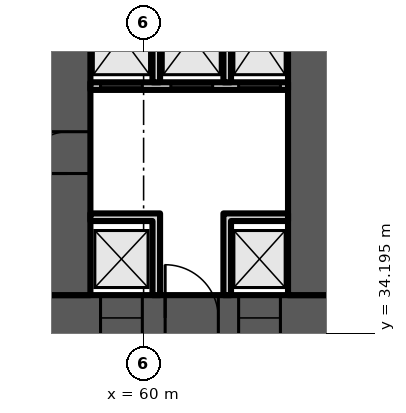
"""IFC4 building model, lengths in metres.
Left out: names, types, materials, properties, quantities, classifications, styles, units other than length and angle.
Written with IfcOpenShell. Run it as: python <this file> out.ifc"""

import sys

from ifc_helpers import new_model, si_unit, direction, frame, frame_2d, origin, place, context, subcontext, project, spatial, polyline, rectangle, outline, extrude, element, fill, save


model = new_model("IFC4")
c1 = context("Model", 3, precision=1e-05, world=origin(), true_north=direction((0.0, 1.0)))
c2 = subcontext(c1, "Body", "Model", "MODEL_VIEW")
j1 = project(units=[si_unit("LENGTHUNIT", "METRE"), si_unit("PLANEANGLEUNIT", "RADIAN")], contexts=[c1])
p1 = place(None, origin())
s1 = spatial("IfcSite", under=j1, at=p1, CompositionType="ELEMENT")
p2 = place(p1, origin())
s2 = spatial("IfcBuilding", under=s1, at=p2, CompositionType="ELEMENT")
p3 = place(p2, frame((0.0, 0.0, 52.3)))
s3 = spatial("IfcBuildingStorey", under=s2, at=p3, CompositionType="ELEMENT", Elevation=52.3)
p4 = place(p3, frame((9.0, 34.6, 0.0), z_axis=(0.0, 0.0, 1.0), x_axis=(1.0, 0.0, 0.0)))
e1 = element("IfcWall", 1, at=p4, inside=s3, PredefinedType="SHEAR", context=c2, shape_type="SweptSolid", body=[
    extrude(rectangle(XDim=56.0, YDim=1.2, at=frame_2d((28.0, 0.0))), origin(), (0.0, 0.0, 1.0), 3.6),
])
p5 = place(p4, frame((2.0, 0.0, 0.0)))
e2 = element("IfcOpeningElement", 2, at=p5, cuts=e1, PredefinedType="OPENING", context=c2, shape_type="SweptSolid", body=[
    extrude(rectangle(XDim=1.0, YDim=2.1, at=frame_2d((0.5, 1.05))), frame((0.0, 0.61, 0.0), z_axis=(0.0, -1.0, 0.0), x_axis=(1.0, 0.0, 0.0)), (0.0, 0.0, 1.0), 1.22),
])
p6 = place(p4, frame((4.6, 0.0, 0.0)))
e3 = element("IfcOpeningElement", 3, at=p6, cuts=e1, PredefinedType="OPENING", context=c2, shape_type="SweptSolid", body=[
    extrude(rectangle(XDim=1.0, YDim=2.1, at=frame_2d((0.5, 1.05))), frame((0.0, 0.61, 0.0), z_axis=(0.0, -1.0, 0.0), x_axis=(1.0, 0.0, 0.0)), (0.0, 0.0, 1.0), 1.22),
])
p7 = place(p4, frame((7.867, 0.0, 0.0)))
e4 = element("IfcOpeningElement", 4, at=p7, cuts=e1, PredefinedType="OPENING", context=c2, shape_type="SweptSolid", body=[
    extrude(rectangle(XDim=1.1, YDim=2.1, at=frame_2d((0.55, 1.05))), frame((0.0, 0.61, 0.0), z_axis=(0.0, -1.0, 0.0), x_axis=(1.0, 0.0, 0.0)), (0.0, 0.0, 1.0), 1.22),
])
p8 = place(p4, frame((12.033, 0.0, 0.0)))
e5 = element("IfcOpeningElement", 5, at=p8, cuts=e1, PredefinedType="OPENING", context=c2, shape_type="SweptSolid", body=[
    extrude(rectangle(XDim=1.1, YDim=2.1, at=frame_2d((0.55, 1.05))), frame((0.0, 0.61, 0.0), z_axis=(0.0, -1.0, 0.0), x_axis=(1.0, 0.0, 0.0)), (0.0, 0.0, 1.0), 1.22),
])
p9 = place(p4, frame((9.8, 0.0, 0.0)))
e6 = element("IfcOpeningElement", 6, at=p9, cuts=e1, PredefinedType="OPENING", context=c2, shape_type="SweptSolid", body=[
    extrude(rectangle(XDim=1.4, YDim=2.1, at=frame_2d((0.7, 1.05))), frame((0.0, 0.61, 0.0), z_axis=(0.0, -1.0, 0.0), x_axis=(1.0, 0.0, 0.0)), (0.0, 0.0, 1.0), 1.22),
])
p10 = place(p4, frame((14.65, 0.0, 0.0)))
e7 = element("IfcOpeningElement", 7, at=p10, cuts=e1, PredefinedType="OPENING", context=c2, shape_type="SweptSolid", body=[
    extrude(rectangle(XDim=1.2, YDim=2.1, at=frame_2d((0.6, 1.05))), frame((0.0, 0.61, 0.0), z_axis=(0.0, -1.0, 0.0), x_axis=(1.0, 0.0, 0.0)), (0.0, 0.0, 1.0), 1.22),
])
p11 = place(p4, frame((21.867, 0.0, 0.0)))
e8 = element("IfcOpeningElement", 8, at=p11, cuts=e1, PredefinedType="OPENING", context=c2, shape_type="SweptSolid", body=[
    extrude(rectangle(XDim=1.1, YDim=2.1, at=frame_2d((0.55, 1.05))), frame((0.0, 0.61, 0.0), z_axis=(0.0, -1.0, 0.0), x_axis=(1.0, 0.0, 0.0)), (0.0, 0.0, 1.0), 1.22),
])
p12 = place(p4, frame((26.033, 0.0, 0.0)))
e9 = element("IfcOpeningElement", 9, at=p12, cuts=e1, PredefinedType="OPENING", context=c2, shape_type="SweptSolid", body=[
    extrude(rectangle(XDim=1.1, YDim=2.1, at=frame_2d((0.55, 1.05))), frame((0.0, 0.61, 0.0), z_axis=(0.0, -1.0, 0.0), x_axis=(1.0, 0.0, 0.0)), (0.0, 0.0, 1.0), 1.22),
])
p13 = place(p4, frame((23.8, 0.0, 0.0)))
e10 = element("IfcOpeningElement", 10, at=p13, cuts=e1, PredefinedType="OPENING", context=c2, shape_type="SweptSolid", body=[
    extrude(rectangle(XDim=1.4, YDim=2.1, at=frame_2d((0.7, 1.05))), frame((0.0, 0.61, 0.0), z_axis=(0.0, -1.0, 0.0), x_axis=(1.0, 0.0, 0.0)), (0.0, 0.0, 1.0), 1.22),
])
p14 = place(p4, frame((28.867, 0.0, 0.0)))
e11 = element("IfcOpeningElement", 11, at=p14, cuts=e1, PredefinedType="OPENING", context=c2, shape_type="SweptSolid", body=[
    extrude(rectangle(XDim=1.1, YDim=2.1, at=frame_2d((0.55, 1.05))), frame((0.0, 0.61, 0.0), z_axis=(0.0, -1.0, 0.0), x_axis=(1.0, 0.0, 0.0)), (0.0, 0.0, 1.0), 1.22),
])
p15 = place(p4, frame((33.033, 0.0, 0.0)))
e12 = element("IfcOpeningElement", 12, at=p15, cuts=e1, PredefinedType="OPENING", context=c2, shape_type="SweptSolid", body=[
    extrude(rectangle(XDim=1.1, YDim=2.1, at=frame_2d((0.55, 1.05))), frame((0.0, 0.61, 0.0), z_axis=(0.0, -1.0, 0.0), x_axis=(1.0, 0.0, 0.0)), (0.0, 0.0, 1.0), 1.22),
])
p16 = place(p4, frame((40.15, 0.0, 0.0)))
e13 = element("IfcOpeningElement", 13, at=p16, cuts=e1, PredefinedType="OPENING", context=c2, shape_type="SweptSolid", body=[
    extrude(rectangle(XDim=1.2, YDim=2.1, at=frame_2d((0.6, 1.05))), frame((0.0, 0.61, 0.0), z_axis=(0.0, -1.0, 0.0), x_axis=(1.0, 0.0, 0.0)), (0.0, 0.0, 1.0), 1.22),
])
p17 = place(p4, frame((44.8, 0.0, 0.0)))
e14 = element("IfcOpeningElement", 14, at=p17, cuts=e1, PredefinedType="OPENING", context=c2, shape_type="SweptSolid", body=[
    extrude(rectangle(XDim=1.4, YDim=2.1, at=frame_2d((0.7, 1.05))), frame((0.0, 0.61, 0.0), z_axis=(0.0, -1.0, 0.0), x_axis=(1.0, 0.0, 0.0)), (0.0, 0.0, 1.0), 1.22),
])
p18 = place(p4, frame((49.867, 0.0, 0.0)))
e15 = element("IfcOpeningElement", 15, at=p18, cuts=e1, PredefinedType="OPENING", context=c2, shape_type="SweptSolid", body=[
    extrude(rectangle(XDim=1.1, YDim=2.1, at=frame_2d((0.55, 1.05))), frame((0.0, 0.61, 0.0), z_axis=(0.0, -1.0, 0.0), x_axis=(1.0, 0.0, 0.0)), (0.0, 0.0, 1.0), 1.22),
])
p19 = place(p4, frame((53.5, 0.0, 0.0)))
e16 = element("IfcOpeningElement", 16, at=p19, cuts=e1, PredefinedType="OPENING", context=c2, shape_type="SweptSolid", body=[
    extrude(rectangle(XDim=1.1, YDim=2.1, at=frame_2d((0.55, 1.05))), frame((0.0, 0.61, 0.0), z_axis=(0.0, -1.0, 0.0), x_axis=(1.0, 0.0, 0.0)), (0.0, 0.0, 1.0), 1.22),
])
p20 = place(p4, frame((51.567, 0.0, 0.0)))
e17 = element("IfcOpeningElement", 17, at=p20, cuts=e1, PredefinedType="OPENING", context=c2, shape_type="SweptSolid", body=[
    extrude(rectangle(XDim=1.4, YDim=2.1, at=frame_2d((0.7, 1.05))), frame((0.0, 0.61, 0.0), z_axis=(0.0, -1.0, 0.0), x_axis=(1.0, 0.0, 0.0)), (0.0, 0.0, 1.0), 1.22),
])
p21 = place(p3, frame((58.0, 35.2, 0.0), z_axis=(0.0, 0.0, 1.0), x_axis=(0.0, 1.0, 0.0)))
e18 = element("IfcWall", 18, at=p21, inside=s3, PredefinedType="SHEAR", context=c2, shape_type="SweptSolid", body=[
    extrude(rectangle(XDim=12.943, YDim=1.2, at=frame_2d((6.471, 0.0))), origin(), (0.0, 0.0, 1.0), 3.6),
])
p22 = place(p21, frame((10.134, 0.0, 0.0)))
e19 = element("IfcOpeningElement", 19, at=p22, cuts=e18, PredefinedType="OPENING", context=c2, shape_type="SweptSolid", body=[
    extrude(rectangle(XDim=1.0, YDim=2.1, at=frame_2d((0.5, 1.05))), frame((0.0, 0.61, 0.0), z_axis=(0.0, -1.0, 0.0), x_axis=(1.0, 0.0, 0.0)), (0.0, 0.0, 1.0), 1.22),
])
p23 = place(p21, frame((3.2, 0.0, 0.0)))
e20 = element("IfcOpeningElement", 20, at=p23, cuts=e18, PredefinedType="OPENING", context=c2, shape_type="SweptSolid", body=[
    extrude(rectangle(XDim=1.1, YDim=2.1, at=frame_2d((0.55, 1.05))), frame((0.0, 0.61, 0.0), z_axis=(0.0, -1.0, 0.0), x_axis=(1.0, 0.0, 0.0)), (0.0, 0.0, 1.0), 1.22),
])
p24 = place(p3, frame((64.4, 35.2, 0.0), z_axis=(0.0, 0.0, 1.0), x_axis=(0.0, 1.0, 0.0)))
e21 = element("IfcWall", 21, at=p24, inside=s3, PredefinedType="SHEAR", context=c2, shape_type="SweptSolid", body=[
    extrude(rectangle(XDim=12.383, YDim=1.2, at=frame_2d((6.191, 0.0))), origin(), (0.0, 0.0, 1.0), 3.6),
])
p25 = place(p3, frame((58.6, 40.7, 0.0), z_axis=(0.0, 0.0, 1.0), x_axis=(1.0, 0.0, 0.0)))
e22 = element("IfcWall", 22, at=p25, inside=s3, PredefinedType="PARTITIONING", context=c2, shape_type="SweptSolid", body=[
    extrude(rectangle(XDim=5.2, YDim=0.2, at=frame_2d((2.6, 0.0))), origin(), (0.0, 0.0, 1.0), 3.2),
])
p26 = place(p25, frame((0.267, 0.0, 0.0)))
e23 = element("IfcOpeningElement", 23, at=p26, cuts=e22, PredefinedType="OPENING", context=c2, shape_type="SweptSolid", body=[
    extrude(rectangle(XDim=1.1, YDim=2.1, at=frame_2d((0.55, 1.05))), frame((0.0, 0.11, 0.0), z_axis=(0.0, -1.0, 0.0), x_axis=(1.0, 0.0, 0.0)), (0.0, 0.0, 1.0), 0.22),
])
p27 = place(p25, frame((2.117, 0.0, 0.0)))
e24 = element("IfcOpeningElement", 24, at=p27, cuts=e22, PredefinedType="OPENING", context=c2, shape_type="SweptSolid", body=[
    extrude(rectangle(XDim=1.1, YDim=2.1, at=frame_2d((0.55, 1.05))), frame((0.0, 0.11, 0.0), z_axis=(0.0, -1.0, 0.0), x_axis=(1.0, 0.0, 0.0)), (0.0, 0.0, 1.0), 0.22),
])
p28 = place(p25, frame((3.9, 0.0, 0.0)))
e25 = element("IfcOpeningElement", 25, at=p28, cuts=e22, PredefinedType="OPENING", context=c2, shape_type="SweptSolid", body=[
    extrude(rectangle(XDim=1.1, YDim=2.1, at=frame_2d((0.55, 1.05))), frame((0.0, 0.11, 0.0), z_axis=(0.0, -1.0, 0.0), x_axis=(1.0, 0.0, 0.0)), (0.0, 0.0, 1.0), 0.22),
])
p29 = place(p3, frame((0.0, 0.0, -0.0)))
e26 = element("IfcWall", 26, at=p29, inside=s3, PredefinedType="PARTITIONING", context=c2, shape_type="SweptSolid", body=[
    extrude(outline(polyline([(60.233, 37.15), (58.6, 37.15), (58.6, 37.35), (60.233, 37.35), (60.433, 37.35), (60.433, 35.2), (60.233, 35.2), (60.233, 37.15)])), origin(), (0.0, 0.0, 1.0), 3.2),
])
p30 = place(p3, frame((0.0, 0.0, -0.0)))
e27 = element("IfcWall", 27, at=p30, inside=s3, PredefinedType="PARTITIONING", context=c2, shape_type="SweptSolid", body=[
    extrude(outline(polyline([(62.1, 37.35), (62.3, 37.35), (63.8, 37.35), (63.8, 37.15), (62.3, 37.15), (62.3, 35.2), (62.1, 35.2), (62.1, 37.35)])), origin(), (0.0, 0.0, 1.0), 3.2),
])
p31 = place(p3, frame((0.0, 0.0, -0.0)))
e28 = element("IfcWall", 28, at=p31, inside=s3, PredefinedType="PARTITIONING", context=c2, shape_type="SweptSolid", body=[
    extrude(outline(polyline([(60.433, 40.8), (60.233, 40.8), (60.233, 43.8), (58.6, 43.8), (58.6, 44.0), (63.8, 44.0), (63.8, 43.8), (62.3, 43.8), (62.3, 40.8), (62.1, 40.8), (62.1, 43.8), (60.433, 43.8), (60.433, 40.8)])), origin(), (0.0, 0.0, 1.0), 3.2),
])
p32 = place(p18, origin())
e29 = element("IfcDoor", 29, at=p32, inside=s3, OperationType="DOUBLE_DOOR_SLIDING", PredefinedType="DOOR", context=c2, shape_type="SweptSolid", body=[
    extrude(rectangle(XDim=1.1, YDim=2.1, at=frame_2d((0.55, 1.05))), frame((0.0, 0.025, 0.0), z_axis=(0.0, -1.0, 0.0), x_axis=(1.0, 0.0, 0.0)), (0.0, 0.0, 1.0), 0.05),
])
fill(e15, e29)
p33 = place(p19, origin())
e30 = element("IfcDoor", 30, at=p33, inside=s3, OperationType="DOUBLE_DOOR_SLIDING", PredefinedType="DOOR", context=c2, shape_type="SweptSolid", body=[
    extrude(rectangle(XDim=1.1, YDim=2.1, at=frame_2d((0.55, 1.05))), frame((0.0, 0.025, 0.0), z_axis=(0.0, -1.0, 0.0), x_axis=(1.0, 0.0, 0.0)), (0.0, 0.0, 1.0), 0.05),
])
fill(e16, e30)
p34 = place(p20, origin())
e31 = element("IfcDoor", 31, at=p34, inside=s3, OperationType="DOUBLE_DOOR_SINGLE_SWING", PredefinedType="DOOR", context=c2, shape_type="SweptSolid", body=[
    extrude(rectangle(XDim=1.4, YDim=2.1, at=frame_2d((0.7, 1.05))), frame((0.0, 0.025, 0.0), z_axis=(0.0, -1.0, 0.0), x_axis=(1.0, 0.0, 0.0)), (0.0, 0.0, 1.0), 0.05),
])
fill(e17, e31)
p35 = place(p26, origin())
e32 = element("IfcDoor", 32, at=p35, inside=s3, OperationType="DOUBLE_DOOR_SLIDING", PredefinedType="DOOR", context=c2, shape_type="SweptSolid", body=[
    extrude(rectangle(XDim=1.1, YDim=2.1, at=frame_2d((0.55, 1.05))), frame((0.0, 0.025, 0.0), z_axis=(0.0, -1.0, 0.0), x_axis=(1.0, 0.0, 0.0)), (0.0, 0.0, 1.0), 0.05),
])
fill(e23, e32)
p36 = place(p27, origin())
e33 = element("IfcDoor", 33, at=p36, inside=s3, OperationType="DOUBLE_DOOR_SLIDING", PredefinedType="DOOR", context=c2, shape_type="SweptSolid", body=[
    extrude(rectangle(XDim=1.1, YDim=2.1, at=frame_2d((0.55, 1.05))), frame((0.0, 0.025, 0.0), z_axis=(0.0, -1.0, 0.0), x_axis=(1.0, 0.0, 0.0)), (0.0, 0.0, 1.0), 0.05),
])
fill(e24, e33)
p37 = place(p28, origin())
e34 = element("IfcDoor", 34, at=p37, inside=s3, OperationType="DOUBLE_DOOR_SLIDING", PredefinedType="DOOR", context=c2, shape_type="SweptSolid", body=[
    extrude(rectangle(XDim=1.1, YDim=2.1, at=frame_2d((0.55, 1.05))), frame((0.0, 0.025, 0.0), z_axis=(0.0, -1.0, 0.0), x_axis=(1.0, 0.0, 0.0)), (0.0, 0.0, 1.0), 0.05),
])
fill(e25, e34)
p38 = place(p23, origin())
e35 = element("IfcDoor", 35, at=p38, inside=s3, OperationType="SINGLE_SWING_LEFT", PredefinedType="DOOR", context=c2, shape_type="SweptSolid", body=[
    extrude(rectangle(XDim=1.1, YDim=2.1, at=frame_2d((0.55, 1.05))), frame((0.0, 0.025, 0.0), z_axis=(0.0, -1.0, 0.0), x_axis=(1.0, 0.0, 0.0)), (0.0, 0.0, 1.0), 0.05),
])
fill(e20, e35)
save(model, sys.argv[1])
